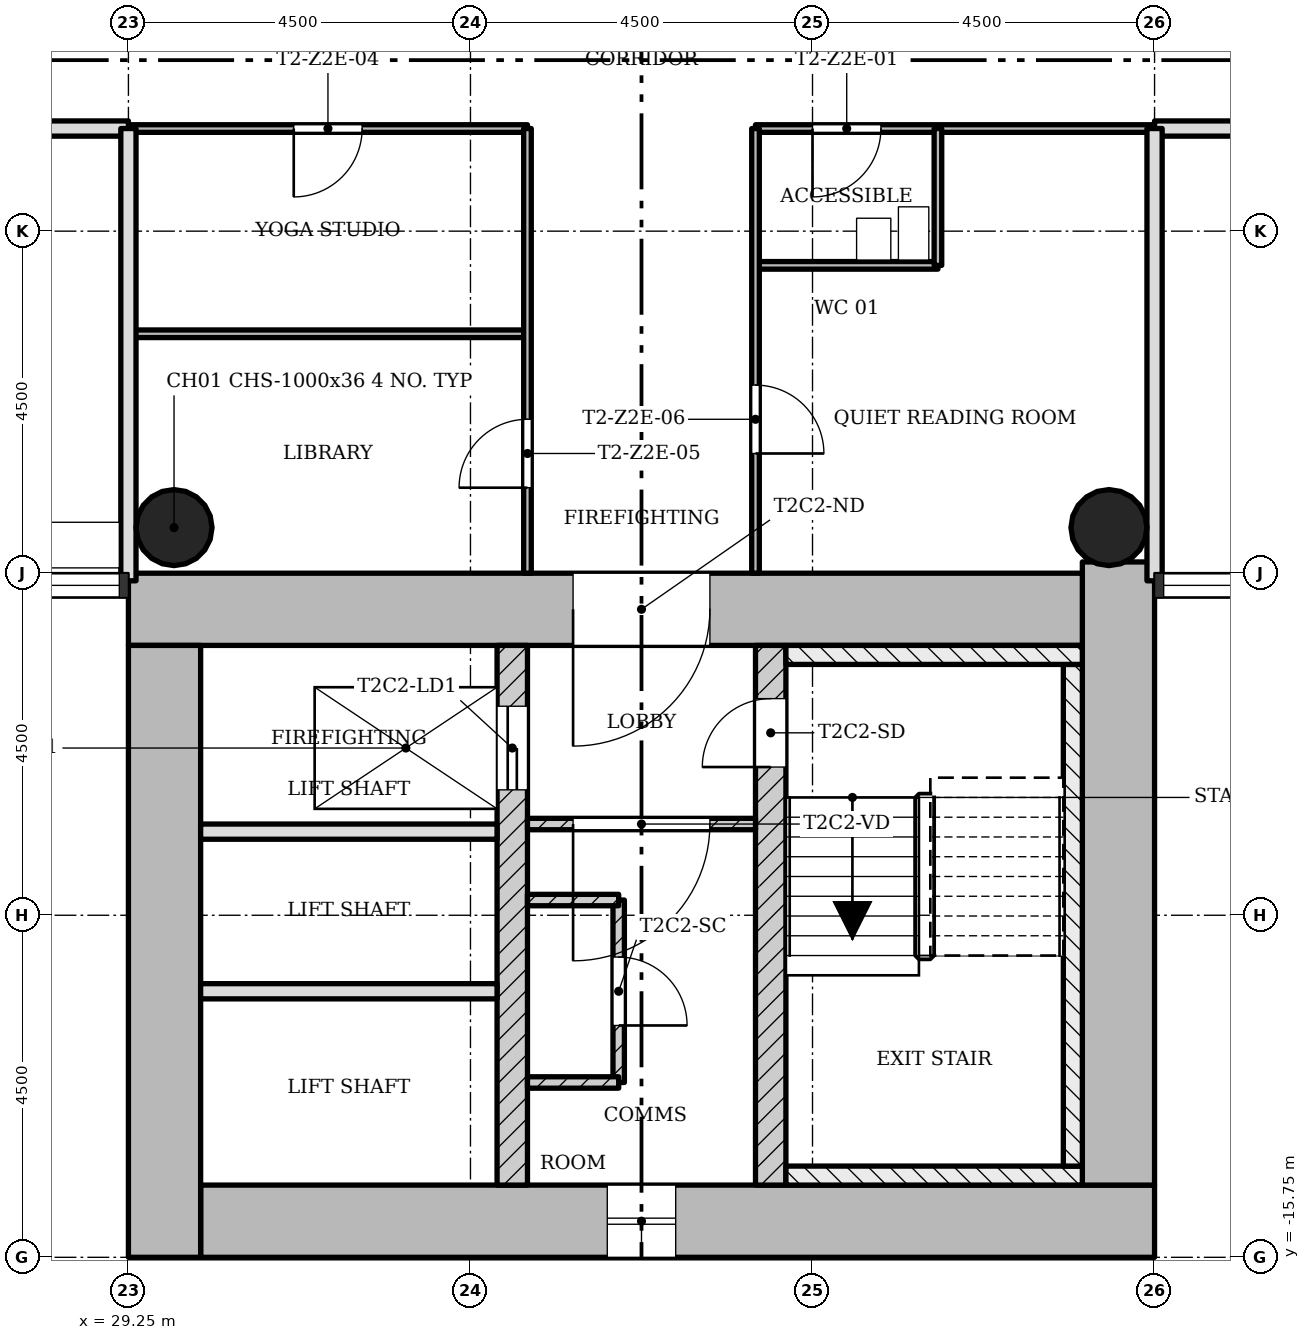
"""IFC4 building model, lengths in metres.
Left out: names, types, materials, properties, quantities, classifications, styles, units other than length and angle.
Written with IfcOpenShell. Run it as: python <this file> out.ifc"""

import sys

from ifc_helpers import new_model, si_unit, direction, frame, frame_2d, origin, origin_2d, place, context, subcontext, project, spatial, rectangle, hollow_circle, extrude, element, fill, save


model = new_model("IFC4")
c1 = context("Model", 3, precision=1e-05, world=origin(), true_north=direction((0.0, 1.0)))
c2 = subcontext(c1, "Body", "Model", "MODEL_VIEW")
j1 = project(units=[si_unit("LENGTHUNIT", "METRE"), si_unit("PLANEANGLEUNIT", "RADIAN")], contexts=[c1])
p1 = place(None, origin())
s1 = spatial("IfcSite", under=j1, at=p1, CompositionType="ELEMENT")
p2 = place(p1, origin())
s2 = spatial("IfcBuilding", under=s1, at=p2, CompositionType="ELEMENT")
p3 = place(p2, frame((0.0, 0.0, 97.0)))
s3 = spatial("IfcBuildingStorey", under=s2, at=p3, CompositionType="ELEMENT", Elevation=97.0)
p4 = place(p3, frame((30.2, -15.275, 0.0), z_axis=(0.0, 0.0, 1.0), x_axis=(1.0, 0.0, 0.0)))
e1 = element("IfcWall", 1, at=p4, inside=s3, PredefinedType="SHEAR", context=c2, shape_type="SweptSolid", body=[
    extrude(rectangle(XDim=12.55, YDim=0.95, at=frame_2d((6.275, 0.0))), origin(), (0.0, 0.0, 1.0), 3.4),
])
p5 = place(p4, frame((5.35, 0.0, 0.45)))
e2 = element("IfcOpeningElement", 2, at=p5, cuts=e1, PredefinedType="OPENING", context=c2, shape_type="SweptSolid", body=[
    extrude(rectangle(XDim=0.9, YDim=2.4, at=frame_2d((0.45, 1.2))), frame((0.0, 0.485, 0.0), z_axis=(0.0, -1.0, 0.0), x_axis=(1.0, 0.0, 0.0)), (0.0, 0.0, 1.0), 0.97),
])
p6 = place(p3, frame((42.275, -14.8, 0.0), z_axis=(0.0, 0.0, 1.0), x_axis=(0.0, 1.0, 0.0)))
e3 = element("IfcWall", 3, at=p6, inside=s3, PredefinedType="SHEAR", context=c2, shape_type="SweptSolid", body=[
    extrude(rectangle(XDim=8.198, YDim=0.95, at=frame_2d((4.099, 0.0))), origin(), (0.0, 0.0, 1.0), 3.4),
])
p7 = place(p3, frame((41.8, -7.225, 0.0), z_axis=(0.0, 0.0, 1.0), x_axis=(-1.0, 0.0, 0.0)))
e4 = element("IfcWall", 4, at=p7, inside=s3, PredefinedType="SHEAR", context=c2, shape_type="SweptSolid", body=[
    extrude(rectangle(XDim=12.55, YDim=0.95, at=frame_2d((6.275, 0.0))), origin(), (0.0, 0.0, 1.0), 3.4),
])
p8 = place(p7, frame((4.9, 0.0, 0.0)))
e5 = element("IfcOpeningElement", 5, at=p8, cuts=e4, PredefinedType="OPENING", context=c2, shape_type="SweptSolid", body=[
    extrude(rectangle(XDim=1.8, YDim=2.1, at=frame_2d((0.9, 1.05))), frame((0.0, 0.485, 0.0), z_axis=(0.0, -1.0, 0.0), x_axis=(1.0, 0.0, 0.0)), (0.0, 0.0, 1.0), 0.97),
])
p9 = place(p3, frame((29.725, -7.7, 0.0), z_axis=(0.0, 0.0, 1.0), x_axis=(0.0, -1.0, 0.0)))
e6 = element("IfcWall", 6, at=p9, inside=s3, PredefinedType="SHEAR", context=c2, shape_type="SweptSolid", body=[
    extrude(rectangle(XDim=8.05, YDim=0.95, at=frame_2d((4.025, 0.0))), origin(), (0.0, 0.0, 1.0), 3.4),
])
p10 = place(p3, frame((34.3, -14.8, 0.0), z_axis=(0.0, 0.0, 1.0), x_axis=(0.0, 1.0, 0.0)))
e7 = element("IfcWall", 7, at=p10, inside=s3, PredefinedType="SHEAR", context=c2, shape_type="SweptSolid", body=[
    extrude(rectangle(XDim=7.1, YDim=0.4, at=frame_2d((3.55, 0.0))), origin(), (0.0, 0.0, 1.0), 3.4),
])
p11 = place(p10, frame((5.2, 0.0, 0.0)))
e8 = element("IfcOpeningElement", 8, at=p11, cuts=e7, PredefinedType="OPENING", context=c2, shape_type="SweptSolid", body=[
    extrude(rectangle(XDim=1.1, YDim=2.1, at=frame_2d((0.55, 1.05))), frame((0.0, 0.21, 0.0), z_axis=(0.0, -1.0, 0.0), x_axis=(1.0, 0.0, 0.0)), (0.0, 0.0, 1.0), 0.42),
])
p12 = place(p3, frame((37.7, -14.8, 0.0), z_axis=(0.0, 0.0, 1.0), x_axis=(0.0, 1.0, 0.0)))
e9 = element("IfcWall", 9, at=p12, inside=s3, PredefinedType="SHEAR", context=c2, shape_type="SweptSolid", body=[
    extrude(rectangle(XDim=7.1, YDim=0.4, at=frame_2d((3.55, 0.0))), origin(), (0.0, 0.0, 1.0), 3.4),
])
p13 = place(p12, frame((5.5, 0.0, 0.0)))
e10 = element("IfcOpeningElement", 10, at=p13, cuts=e9, PredefinedType="OPENING", context=c2, shape_type="SweptSolid", body=[
    extrude(rectangle(XDim=0.9, YDim=2.1, at=frame_2d((0.45, 1.05))), frame((0.0, 0.21, 0.0), z_axis=(0.0, -1.0, 0.0), x_axis=(1.0, 0.0, 0.0)), (0.0, 0.0, 1.0), 0.42),
])
for number, where, z_axis, x_axis in (
    (11, (42.15, -6.15, 0.0), (0.0, 0.0, 1.0), (1.0, 0.0, 0.0)),
    (12, (29.85, -6.15, 0.0), (0.0, 0.0, 1.0), (1.0, 0.0, 0.0)),
):
    element("IfcColumn", number, at=place(p3, frame(where, z_axis=z_axis, x_axis=x_axis)), inside=s3, PredefinedType="COLUMN", context=c2, shape_type="SweptSolid", body=[
        extrude(hollow_circle(Radius=0.5, WallThickness=0.036, at=origin_2d()), origin(), (0.0, 0.0, 1.0), 3.4),
    ])
p14 = place(p3, frame((34.5, -10.05, 0.0), z_axis=(0.0, 0.0, 1.0), x_axis=(1.0, 0.0, 0.0)))
e13 = element("IfcWall", 13, at=p14, inside=s3, PredefinedType="PARTITIONING", context=c2, shape_type="SweptSolid", body=[
    extrude(rectangle(XDim=3.0, YDim=0.15, at=frame_2d((1.5, 0.0))), origin(), (0.0, 0.0, 1.0), 3.0),
])
p15 = place(p14, frame((0.6, 0.0, 0.0)))
e14 = element("IfcOpeningElement", 14, at=p15, cuts=e13, PredefinedType="OPENING", context=c2, shape_type="SweptSolid", body=[
    extrude(rectangle(XDim=1.8, YDim=2.1, at=frame_2d((0.9, 1.05))), frame((0.0, 0.085, 0.0), z_axis=(0.0, -1.0, 0.0), x_axis=(1.0, 0.0, 0.0)), (0.0, 0.0, 1.0), 0.17),
])
for number, where, z_axis, x_axis in (
    (15, (30.2, -10.15, 0.0), (0.0, 0.0, 1.0), (1.0, 0.0, 0.0)),
    (16, (30.2, -12.25, 0.0), (0.0, 0.0, 1.0), (1.0, 0.0, 0.0)),
):
    element("IfcWall", number, at=place(p3, frame(where, z_axis=z_axis, x_axis=x_axis)), inside=s3, PredefinedType="SOLIDWALL", context=c2, shape_type="SweptSolid", body=[
        extrude(rectangle(XDim=3.9, YDim=0.2, at=frame_2d((1.95, 0.0))), origin(), (0.0, 0.0, 1.0), 3.0),
    ])
p16 = place(p3, frame((35.7, -11.05, 0.0), z_axis=(0.0, 0.0, 1.0), x_axis=(0.0, -1.0, 0.0)))
e17 = element("IfcWall", 17, at=p16, inside=s3, PredefinedType="PARTITIONING", context=c2, shape_type="SweptSolid", body=[
    extrude(rectangle(XDim=2.4, YDim=0.15, at=frame_2d((1.2, 0.0))), origin(), (0.0, 0.0, 1.0), 3.0),
])
p17 = place(p16, frame((0.75, 0.0, 0.0)))
e18 = element("IfcOpeningElement", 18, at=p17, cuts=e17, PredefinedType="OPENING", context=c2, shape_type="SweptSolid", body=[
    extrude(rectangle(XDim=0.9, YDim=2.1, at=frame_2d((0.45, 1.05))), frame((0.0, 0.085, 0.0), z_axis=(0.0, -1.0, 0.0), x_axis=(1.0, 0.0, 0.0)), (0.0, 0.0, 1.0), 0.17),
])
for number, where, z_axis, x_axis in (
    (19, (35.7, -11.05, 0.0), (0.0, 0.0, 1.0), (-1.0, 0.0, 0.0)),
    (20, (35.7, -13.45, 0.0), (0.0, 0.0, 1.0), (-1.0, 0.0, 0.0)),
):
    element("IfcWall", number, at=place(p3, frame(where, z_axis=z_axis, x_axis=x_axis)), inside=s3, PredefinedType="PARTITIONING", context=c2, shape_type="SweptSolid", body=[
        extrude(rectangle(XDim=1.2, YDim=0.15, at=frame_2d((0.6, 0.0))), origin(), (0.0, 0.0, 1.0), 3.0),
    ])
p18 = place(p3, frame((34.5, -3.6, 0.0), z_axis=(0.0, 0.0, 1.0), x_axis=(-1.0, 0.0, 0.0)))
e21 = element("IfcWall", 21, at=p18, inside=s3, PredefinedType="PARTITIONING", context=c2, shape_type="SweptSolid", body=[
    extrude(rectangle(XDim=5.25, YDim=0.1, at=frame_2d((2.625, 0.0))), origin(), (0.0, 0.0, 1.0), 3.0),
])
p19 = place(p3, frame((39.9, -2.7, 0.0), z_axis=(0.0, 0.0, 1.0), x_axis=(-1.0, 0.0, 0.0)))
e22 = element("IfcWall", 22, at=p19, inside=s3, PredefinedType="PARTITIONING", context=c2, shape_type="SweptSolid", body=[
    extrude(rectangle(XDim=2.4, YDim=0.1, at=frame_2d((1.2, 0.0))), origin(), (0.0, 0.0, 1.0), 3.0),
])
p20 = place(p3, frame((42.75, -0.9, 0.0), z_axis=(0.0, 0.0, 1.0), x_axis=(-1.0, 0.0, 0.0)))
e23 = element("IfcWall", 23, at=p20, inside=s3, PredefinedType="PARTITIONING", context=c2, shape_type="SweptSolid", body=[
    extrude(rectangle(XDim=5.25, YDim=0.1, at=frame_2d((2.625, 0.0))), origin(), (0.0, 0.0, 1.0), 3.0),
])
p21 = place(p20, frame((3.6, 0.0, 0.0)))
e24 = element("IfcOpeningElement", 24, at=p21, cuts=e23, PredefinedType="OPENING", context=c2, shape_type="SweptSolid", body=[
    extrude(rectangle(XDim=0.9, YDim=2.1, at=frame_2d((0.45, 1.05))), frame((0.0, 0.06, 0.0), z_axis=(0.0, -1.0, 0.0), x_axis=(1.0, 0.0, 0.0)), (0.0, 0.0, 1.0), 0.12),
])
p22 = place(p3, frame((34.5, -0.9, 0.0), z_axis=(0.0, 0.0, 1.0), x_axis=(-1.0, 0.0, 0.0)))
e25 = element("IfcWall", 25, at=p22, inside=s3, PredefinedType="PARTITIONING", context=c2, shape_type="SweptSolid", body=[
    extrude(rectangle(XDim=5.25, YDim=0.1, at=frame_2d((2.625, 0.0))), origin(), (0.0, 0.0, 1.0), 3.0),
])
p23 = place(p22, frame((2.175, 0.0, 0.0)))
e26 = element("IfcOpeningElement", 26, at=p23, cuts=e25, PredefinedType="OPENING", context=c2, shape_type="SweptSolid", body=[
    extrude(rectangle(XDim=0.9, YDim=2.1, at=frame_2d((0.45, 1.05))), frame((0.0, 0.06, 0.0), z_axis=(0.0, -1.0, 0.0), x_axis=(1.0, 0.0, 0.0)), (0.0, 0.0, 1.0), 0.12),
])
for number, where, z_axis, x_axis in (
    (27, (44.55, -0.9, 0.0), (0.0, 0.0, 1.0), (-1.0, 0.0, 0.0)),
    (28, (29.25, -0.9, 0.0), (0.0, 0.0, 1.0), (-1.0, 0.0, 0.0)),
):
    element("IfcWall", number, at=place(p3, frame(where, z_axis=z_axis, x_axis=x_axis)), inside=s3, PredefinedType="SOLIDWALL", context=c2, shape_type="SweptSolid", body=[
        extrude(rectangle(XDim=1.8, YDim=0.2, at=frame_2d((0.9, 0.0))), origin(), (0.0, 0.0, 1.0), 3.0),
    ])
p24 = place(p3, frame((42.75, -6.85, 0.0), z_axis=(0.0, 0.0, 1.0), x_axis=(0.0, 1.0, 0.0)))
e29 = element("IfcWall", 29, at=p24, inside=s3, PredefinedType="SOLIDWALL", context=c2, shape_type="SweptSolid", body=[
    extrude(rectangle(XDim=5.95, YDim=0.2, at=frame_2d((2.975, 0.0))), origin(), (0.0, 0.0, 1.0), 3.0),
])
p25 = place(p3, frame((39.9, -2.7, 0.0), z_axis=(0.0, 0.0, 1.0), x_axis=(0.0, 1.0, 0.0)))
e30 = element("IfcWall", 30, at=p25, inside=s3, PredefinedType="PARTITIONING", context=c2, shape_type="SweptSolid", body=[
    extrude(rectangle(XDim=1.8, YDim=0.1, at=frame_2d((0.9, 0.0))), origin(), (0.0, 0.0, 1.0), 3.0),
])
p26 = place(p3, frame((37.5, -6.75, 0.0), z_axis=(0.0, 0.0, 1.0), x_axis=(0.0, 1.0, 0.0)))
e31 = element("IfcWall", 31, at=p26, inside=s3, PredefinedType="PARTITIONING", context=c2, shape_type="SweptSolid", body=[
    extrude(rectangle(XDim=5.85, YDim=0.1, at=frame_2d((2.925, 0.0))), origin(), (0.0, 0.0, 1.0), 3.0),
])
p27 = place(p26, frame((1.575, 0.0, 0.0)))
e32 = element("IfcOpeningElement", 32, at=p27, cuts=e31, PredefinedType="OPENING", context=c2, shape_type="SweptSolid", body=[
    extrude(rectangle(XDim=0.9, YDim=2.1, at=frame_2d((0.45, 1.05))), frame((0.0, 0.06, 0.0), z_axis=(0.0, -1.0, 0.0), x_axis=(1.0, 0.0, 0.0)), (0.0, 0.0, 1.0), 0.12),
])
p28 = place(p3, frame((34.5, -6.75, 0.0), z_axis=(0.0, 0.0, 1.0), x_axis=(0.0, 1.0, 0.0)))
e33 = element("IfcWall", 33, at=p28, inside=s3, PredefinedType="PARTITIONING", context=c2, shape_type="SweptSolid", body=[
    extrude(rectangle(XDim=5.85, YDim=0.1, at=frame_2d((2.925, 0.0))), origin(), (0.0, 0.0, 1.0), 3.0),
])
p29 = place(p28, frame((1.125, 0.0, 0.0)))
e34 = element("IfcOpeningElement", 34, at=p29, cuts=e33, PredefinedType="OPENING", context=c2, shape_type="SweptSolid", body=[
    extrude(rectangle(XDim=0.9, YDim=2.1, at=frame_2d((0.45, 1.05))), frame((0.0, 0.06, 0.0), z_axis=(0.0, -1.0, 0.0), x_axis=(1.0, 0.0, 0.0)), (0.0, 0.0, 1.0), 0.12),
])
p30 = place(p3, frame((29.25, -6.85, 0.0), z_axis=(0.0, 0.0, 1.0), x_axis=(0.0, 1.0, 0.0)))
e35 = element("IfcWall", 35, at=p30, inside=s3, PredefinedType="SOLIDWALL", context=c2, shape_type="SweptSolid", body=[
    extrude(rectangle(XDim=5.95, YDim=0.2, at=frame_2d((2.975, 0.0))), origin(), (0.0, 0.0, 1.0), 3.0),
])
p31 = place(p3, frame((37.9, -14.675, 0.0), z_axis=(0.0, 0.0, 1.0), x_axis=(1.0, 0.0, 0.0)))
e36 = element("IfcWall", 36, at=p31, inside=s3, PredefinedType="SHEAR", context=c2, shape_type="SweptSolid", body=[
    extrude(rectangle(XDim=3.9, YDim=0.25, at=frame_2d((1.95, 0.0))), origin(), (0.0, 0.0, 1.0), 3.4),
])
p32 = place(p3, frame((41.675, -7.95, 0.0), z_axis=(0.0, 0.0, 1.0), x_axis=(0.0, -1.0, 0.0)))
e37 = element("IfcWall", 37, at=p32, inside=s3, PredefinedType="SHEAR", context=c2, shape_type="SweptSolid", body=[
    extrude(rectangle(XDim=6.6, YDim=0.25, at=frame_2d((3.3, 0.0))), origin(), (0.0, 0.0, 1.0), 3.4),
])
p33 = place(p3, frame((37.9, -7.825, 0.0), z_axis=(0.0, 0.0, 1.0), x_axis=(1.0, 0.0, 0.0)))
e38 = element("IfcWall", 38, at=p33, inside=s3, PredefinedType="SHEAR", context=c2, shape_type="SweptSolid", body=[
    extrude(rectangle(XDim=3.9, YDim=0.25, at=frame_2d((1.95, 0.0))), origin(), (0.0, 0.0, 1.0), 3.4),
])
p34 = place(p5, origin())
e39 = element("IfcWindow", 39, at=p34, inside=s3, PartitioningType="SINGLE_PANEL", PredefinedType="WINDOW", context=c2, shape_type="SweptSolid", body=[
    extrude(rectangle(XDim=0.9, YDim=2.4, at=frame_2d((0.45, 1.2))), frame((0.0, 0.03, 0.0), z_axis=(0.0, -1.0, 0.0), x_axis=(1.0, 0.0, 0.0)), (0.0, 0.0, 1.0), 0.06),
])
fill(e2, e39)
p35 = place(p15, origin())
e40 = element("IfcDoor", 40, at=p35, inside=s3, OperationType="SINGLE_SWING_LEFT", PredefinedType="DOOR", context=c2, shape_type="SweptSolid", body=[
    extrude(rectangle(XDim=1.8, YDim=2.1, at=frame_2d((0.9, 1.05))), frame((0.0, 0.025, 0.0), z_axis=(0.0, -1.0, 0.0), x_axis=(1.0, 0.0, 0.0)), (0.0, 0.0, 1.0), 0.05),
])
fill(e14, e40)
p36 = place(p17, origin())
e41 = element("IfcDoor", 41, at=p36, inside=s3, OperationType="SINGLE_SWING_LEFT", PredefinedType="DOOR", context=c2, shape_type="SweptSolid", body=[
    extrude(rectangle(XDim=0.9, YDim=2.1, at=frame_2d((0.45, 1.05))), frame((0.0, 0.025, 0.0), z_axis=(0.0, -1.0, 0.0), x_axis=(1.0, 0.0, 0.0)), (0.0, 0.0, 1.0), 0.05),
])
fill(e18, e41)
p37 = place(p21, origin())
e42 = element("IfcDoor", 42, at=p37, inside=s3, OperationType="SINGLE_SWING_LEFT", PredefinedType="DOOR", context=c2, shape_type="SweptSolid", body=[
    extrude(rectangle(XDim=0.9, YDim=2.1, at=frame_2d((0.45, 1.05))), frame((0.0, 0.025, 0.0), z_axis=(0.0, -1.0, 0.0), x_axis=(1.0, 0.0, 0.0)), (0.0, 0.0, 1.0), 0.05),
])
fill(e24, e42)
p38 = place(p23, origin())
e43 = element("IfcDoor", 43, at=p38, inside=s3, OperationType="SINGLE_SWING_LEFT", PredefinedType="DOOR", context=c2, shape_type="SweptSolid", body=[
    extrude(rectangle(XDim=0.9, YDim=2.1, at=frame_2d((0.45, 1.05))), frame((0.0, 0.025, 0.0), z_axis=(0.0, -1.0, 0.0), x_axis=(1.0, 0.0, 0.0)), (0.0, 0.0, 1.0), 0.05),
])
fill(e26, e43)
p39 = place(p29, origin())
e44 = element("IfcDoor", 44, at=p39, inside=s3, OperationType="SINGLE_SWING_RIGHT", PredefinedType="DOOR", context=c2, shape_type="SweptSolid", body=[
    extrude(rectangle(XDim=0.9, YDim=2.1, at=frame_2d((0.45, 1.05))), frame((0.0, 0.025, 0.0), z_axis=(0.0, -1.0, 0.0), x_axis=(1.0, 0.0, 0.0)), (0.0, 0.0, 1.0), 0.05),
])
fill(e34, e44)
p40 = place(p27, origin())
e45 = element("IfcDoor", 45, at=p40, inside=s3, OperationType="SINGLE_SWING_LEFT", PredefinedType="DOOR", context=c2, shape_type="SweptSolid", body=[
    extrude(rectangle(XDim=0.9, YDim=2.1, at=frame_2d((0.45, 1.05))), frame((0.0, 0.025, 0.0), z_axis=(0.0, -1.0, 0.0), x_axis=(1.0, 0.0, 0.0)), (0.0, 0.0, 1.0), 0.05),
])
fill(e32, e45)
p41 = place(p13, origin())
e46 = element("IfcDoor", 46, at=p41, inside=s3, OperationType="SINGLE_SWING_RIGHT", PredefinedType="DOOR", context=c2, shape_type="SweptSolid", body=[
    extrude(rectangle(XDim=0.9, YDim=2.1, at=frame_2d((0.45, 1.05))), frame((0.0, 0.025, 0.0), z_axis=(0.0, -1.0, 0.0), x_axis=(1.0, 0.0, 0.0)), (0.0, 0.0, 1.0), 0.05),
])
fill(e10, e46)
p42 = place(p11, origin())
e47 = element("IfcDoor", 47, at=p42, inside=s3, OperationType="SLIDING_TO_LEFT", PredefinedType="DOOR", context=c2, shape_type="SweptSolid", body=[
    extrude(rectangle(XDim=1.1, YDim=2.1, at=frame_2d((0.55, 1.05))), frame((0.0, 0.025, 0.0), z_axis=(0.0, -1.0, 0.0), x_axis=(1.0, 0.0, 0.0)), (0.0, 0.0, 1.0), 0.05),
])
fill(e8, e47)
p43 = place(p8, origin())
e48 = element("IfcDoor", 48, at=p43, inside=s3, OperationType="SINGLE_SWING_LEFT", PredefinedType="DOOR", context=c2, shape_type="SweptSolid", body=[
    extrude(rectangle(XDim=1.8, YDim=2.1, at=frame_2d((0.9, 1.05))), frame((0.0, 0.025, 0.0), z_axis=(0.0, -1.0, 0.0), x_axis=(1.0, 0.0, 0.0)), (0.0, 0.0, 1.0), 0.05),
])
fill(e5, e48)
save(model, sys.argv[1])
